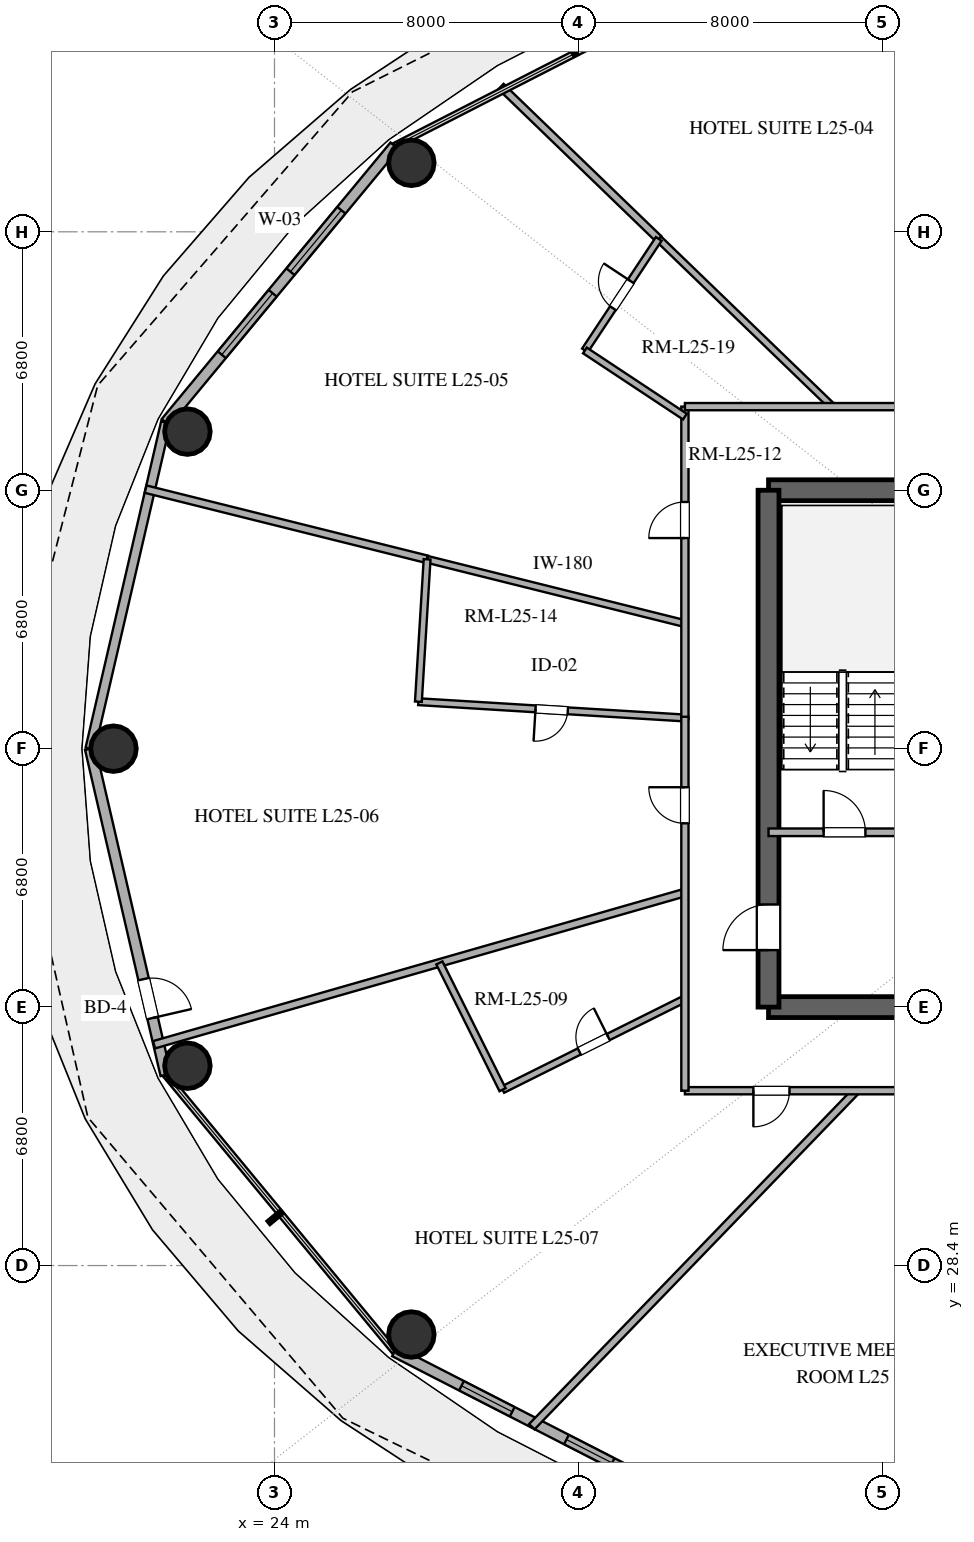
"""IFC4 building model, lengths in metres.
Left out: names, types, materials, properties, quantities, classifications, styles, units other than length and angle.
Written with IfcOpenShell. Run it as: python <this file> out.ifc"""

import sys

from ifc_helpers import new_model, si_unit, direction, frame, frame_2d, origin, origin_2d, place, context, subcontext, project, spatial, rectangle, hollow_circle, extrude, element, fill, save


model = new_model("IFC4")
c1 = context("Model", 3, precision=1e-05, world=origin(), true_north=direction((0.0, 1.0)))
c2 = subcontext(c1, "Body", "Model", "MODEL_VIEW")
j1 = project(units=[si_unit("LENGTHUNIT", "METRE"), si_unit("PLANEANGLEUNIT", "RADIAN")], contexts=[c1])
p1 = place(None, origin())
s1 = spatial("IfcSite", under=j1, at=p1, CompositionType="ELEMENT")
p2 = place(p1, origin())
s2 = spatial("IfcBuilding", under=s1, at=p2, CompositionType="ELEMENT")
p3 = place(p2, frame((0.0, 0.0, 102.0)))
s3 = spatial("IfcBuildingStorey", under=s2, at=p3, CompositionType="ELEMENT", Elevation=102.0)
for number, where, z_axis, x_axis in (
    (1, (37.0, 35.2, 0.0), (0.0, 0.0, 1.0), (1.0, 0.0, 0.0)),
    (2, (37.0, 48.8, 0.0), (0.0, 0.0, 1.0), (1.0, 0.0, 0.0)),
):
    element("IfcWall", number, at=place(p3, frame(where, z_axis=z_axis, x_axis=x_axis)), inside=s3, PredefinedType="SHEAR", context=c2, shape_type="SweptSolid", body=[
        extrude(rectangle(XDim=4.0, YDim=0.55, at=frame_2d((2.0, 0.0))), origin(), (0.0, 0.0, 1.0), 3.38),
    ])
p4 = place(p3, frame((37.0, 35.2, 0.0), z_axis=(0.0, 0.0, 1.0), x_axis=(0.0, 1.0, 0.0)))
e3 = element("IfcWall", 3, at=p4, inside=s3, PredefinedType="SHEAR", context=c2, shape_type="SweptSolid", body=[
    extrude(rectangle(XDim=13.6, YDim=0.55, at=frame_2d((6.8, 0.0))), origin(), (0.0, 0.0, 1.0), 3.38),
])
p5 = place(p4, frame((1.5, 0.0, 0.0)))
e4 = element("IfcOpeningElement", 4, at=p5, cuts=e3, PredefinedType="OPENING", context=c2, shape_type="SweptSolid", body=[
    extrude(rectangle(XDim=1.2, YDim=2.15, at=frame_2d((0.6, 1.075))), frame((0.0, 0.285, 0.0), z_axis=(0.0, -1.0, 0.0), x_axis=(1.0, 0.0, 0.0)), (0.0, 0.0, 1.0), 0.57),
])
for number, where, z_axis, x_axis in (
    (5, (27.602, 57.415, 0.0), (0.0, 0.0, 1.0), (1.0, 0.0, 0.0)),
    (6, (21.709, 50.343, 0.0), (0.0, 0.0, 1.0), (1.0, 0.0, 0.0)),
    (7, (19.763, 42.0, 0.0), (0.0, 0.0, 1.0), (1.0, 0.0, 0.0)),
    (8, (21.709, 33.657, 0.0), (0.0, 0.0, 1.0), (1.0, 0.0, 0.0)),
    (9, (27.602, 26.585, 0.0), (0.0, 0.0, 1.0), (1.0, 0.0, 0.0)),
):
    element("IfcColumn", number, at=place(p3, frame(where, z_axis=z_axis, x_axis=x_axis)), inside=s3, PredefinedType="COLUMN", context=c2, shape_type="SweptSolid", body=[
        extrude(hollow_circle(Radius=0.6, WallThickness=0.032, at=origin_2d()), origin(), (0.0, 0.0, 1.0), 3.38),
    ])
p6 = place(p3, frame((27.16, 57.86, 0.0), z_axis=(0.0, 0.0, 1.0), x_axis=(-0.637505817448, -0.770445541696, 0.0)))
e10 = element("IfcWall", 10, at=p6, inside=s3, PredefinedType="SOLIDWALL", context=c2, shape_type="SweptSolid", body=[
    extrude(rectangle(XDim=9.445, YDim=0.28, at=frame_2d((4.723, 0.0))), origin(), (0.0, 0.0, 1.0), 3.38),
])
p7 = place(p6, frame((2.197, 0.0, 0.85)))
e11 = element("IfcOpeningElement", 11, at=p7, cuts=e10, PredefinedType="OPENING", context=c2, shape_type="SweptSolid", body=[
    extrude(rectangle(XDim=2.1, YDim=2.2, at=frame_2d((1.05, 1.1))), frame((0.0, 0.15, 0.0), z_axis=(0.0, -1.0, 0.0), x_axis=(1.0, 0.0, 0.0)), (0.0, 0.0, 1.0), 0.3),
])
p8 = place(p6, frame((5.032, 0.0, 0.85)))
e12 = element("IfcOpeningElement", 12, at=p8, cuts=e10, PredefinedType="OPENING", context=c2, shape_type="SweptSolid", body=[
    extrude(rectangle(XDim=2.1, YDim=2.2, at=frame_2d((1.05, 1.1))), frame((0.0, 0.15, 0.0), z_axis=(0.0, -1.0, 0.0), x_axis=(1.0, 0.0, 0.0)), (0.0, 0.0, 1.0), 0.3),
])
p9 = place(p3, frame((21.139, 50.583, 0.0), z_axis=(0.0, 0.0, 1.0), x_axis=(-0.22558597182, -0.974223264616, 0.0)))
e13 = element("IfcWall", 13, at=p9, inside=s3, PredefinedType="SOLIDWALL", context=c2, shape_type="SweptSolid", body=[
    extrude(rectangle(XDim=8.811, YDim=0.25, at=frame_2d((4.405, 0.0))), origin(), (0.0, 0.0, 1.0), 3.38),
])
p10 = place(p3, frame((19.151, 42.0, 0.0), z_axis=(0.0, 0.0, 1.0), x_axis=(0.22558597182, -0.974223264616, 0.0)))
e14 = element("IfcWall", 14, at=p10, inside=s3, PredefinedType="SOLIDWALL", context=c2, shape_type="SweptSolid", body=[
    extrude(rectangle(XDim=8.811, YDim=0.28, at=frame_2d((4.405, 0.0))), origin(), (0.0, 0.0, 1.0), 3.38),
])
p11 = place(p10, frame((6.225, 0.0, 0.0)))
e15 = element("IfcOpeningElement", 15, at=p11, cuts=e14, PredefinedType="OPENING", context=c2, shape_type="SweptSolid", body=[
    extrude(rectangle(XDim=1.05, YDim=2.2, at=frame_2d((0.525, 1.1))), frame((0.0, 0.15, 0.0), z_axis=(0.0, -1.0, 0.0), x_axis=(1.0, 0.0, 0.0)), (0.0, 0.0, 1.0), 0.3),
])
p12 = place(p3, frame((27.16, 26.14, 0.0), z_axis=(0.0, 0.0, 1.0), x_axis=(0.889959505023, -0.45603955905, 0.0)))
e16 = element("IfcWall", 16, at=p12, inside=s3, PredefinedType="SOLIDWALL", context=c2, shape_type="SweptSolid", body=[
    extrude(rectangle(XDim=10.662, YDim=0.28, at=frame_2d((5.331, 0.0))), origin(), (0.0, 0.0, 1.0), 3.38),
])
p13 = place(p12, frame((1.979, 0.0, 0.85)))
e17 = element("IfcOpeningElement", 17, at=p13, cuts=e16, PredefinedType="OPENING", context=c2, shape_type="SweptSolid", body=[
    extrude(rectangle(XDim=1.5, YDim=1.8, at=frame_2d((0.75, 0.9))), frame((0.0, 0.15, 0.0), z_axis=(0.0, -1.0, 0.0), x_axis=(1.0, 0.0, 0.0)), (0.0, 0.0, 1.0), 0.3),
])
p14 = place(p12, frame((5.082, 0.0, 0.85)))
e18 = element("IfcOpeningElement", 18, at=p14, cuts=e16, PredefinedType="OPENING", context=c2, shape_type="SweptSolid", body=[
    extrude(rectangle(XDim=1.35, YDim=1.8, at=frame_2d((0.675, 0.9))), frame((0.0, 0.15, 0.0), z_axis=(0.0, -1.0, 0.0), x_axis=(1.0, 0.0, 0.0)), (0.0, 0.0, 1.0), 0.3),
])
p15 = place(p12, frame((7.146, 0.0, 0.85)))
e19 = element("IfcOpeningElement", 19, at=p15, cuts=e16, PredefinedType="OPENING", context=c2, shape_type="SweptSolid", body=[
    extrude(rectangle(XDim=1.35, YDim=1.8, at=frame_2d((0.675, 0.9))), frame((0.0, 0.15, 0.0), z_axis=(0.0, -1.0, 0.0), x_axis=(1.0, 0.0, 0.0)), (0.0, 0.0, 1.0), 0.3),
])
p16 = place(p3, frame((37.0, 39.8, 0.0), z_axis=(0.0, 0.0, 1.0), x_axis=(1.0, 0.0, 0.0)))
e20 = element("IfcWall", 20, at=p16, inside=s3, PredefinedType="SOLIDWALL", context=c2, shape_type="SweptSolid", body=[
    extrude(rectangle(XDim=4.0, YDim=0.2, at=frame_2d((2.0, 0.0))), origin(), (0.0, 0.0, 1.0), 2.74),
])
p17 = place(p16, frame((1.45, 0.0, 0.0)))
e21 = element("IfcOpeningElement", 21, at=p17, cuts=e20, PredefinedType="OPENING", context=c2, shape_type="SweptSolid", body=[
    extrude(rectangle(XDim=1.1, YDim=2.15, at=frame_2d((0.55, 1.075))), frame((0.0, 0.11, 0.0), z_axis=(0.0, -1.0, 0.0), x_axis=(1.0, 0.0, 0.0)), (0.0, 0.0, 1.0), 0.22),
])
p18 = place(p3, frame((30.772, 24.16, 0.0), z_axis=(0.0, 0.0, 1.0), x_axis=(0.694672506389, 0.719326149161, 0.0)))
e22 = element("IfcWall", 22, at=p18, inside=s3, PredefinedType="PARTITIONING", context=c2, shape_type="SweptSolid", body=[
    extrude(rectangle(XDim=12.289, YDim=0.2, at=frame_2d((6.145, 0.0))), origin(), (0.0, 0.0, 1.0), 2.74),
])
p19 = place(p3, frame((34.8, 38.215, 0.0), z_axis=(0.0, 0.0, 1.0), x_axis=(-0.961261030421, -0.275639676741, 0.0)))
e23 = element("IfcWall", 23, at=p19, inside=s3, PredefinedType="PARTITIONING", context=c2, shape_type="SweptSolid", body=[
    extrude(rectangle(XDim=14.531, YDim=0.2, at=frame_2d((7.266, 0.0))), origin(), (0.0, 0.0, 1.0), 2.74),
])
p20 = place(p3, frame((20.609, 48.829, 0.0), z_axis=(0.0, 0.0, 1.0), x_axis=(0.970302209845, -0.241895889938, 0.0)))
e24 = element("IfcWall", 24, at=p20, inside=s3, PredefinedType="PARTITIONING", context=c2, shape_type="SweptSolid", body=[
    extrude(rectangle(XDim=7.633, YDim=0.2, at=frame_2d((3.817, 0.0))), origin(), (0.0, 0.0, 1.0), 2.74),
])
p21 = place(p3, frame((34.8, 42.807, 0.0), z_axis=(0.0, 0.0, 1.0), x_axis=(-0.998134708281, 0.061050013314, 0.0)))
e25 = element("IfcWall", 25, at=p21, inside=s3, PredefinedType="PLUMBINGWALL", context=c2, shape_type="SweptSolid", body=[
    extrude(rectangle(XDim=7.026, YDim=0.18, at=frame_2d((3.513, 0.0))), origin(), (0.0, 0.0, 1.0), 2.74),
])
p22 = place(p21, frame((3.088, 0.0, 0.0)))
e26 = element("IfcOpeningElement", 26, at=p22, cuts=e25, PredefinedType="OPENING", context=c2, shape_type="SweptSolid", body=[
    extrude(rectangle(XDim=0.85, YDim=2.1, at=frame_2d((0.425, 1.05))), frame((0.0, 0.1, 0.0), z_axis=(0.0, -1.0, 0.0), x_axis=(1.0, 0.0, 0.0)), (0.0, 0.0, 1.0), 0.2),
])
p23 = place(p3, frame((28.016, 46.983, 0.0), z_axis=(0.0, 0.0, 1.0), x_axis=(0.970290206094, -0.241944034764, 0.0)))
e27 = element("IfcWall", 27, at=p23, inside=s3, PredefinedType="PLUMBINGWALL", context=c2, shape_type="SweptSolid", body=[
    extrude(rectangle(XDim=6.992, YDim=0.18, at=frame_2d((3.496, 0.0))), origin(), (0.0, 0.0, 1.0), 2.74),
])
p24 = place(p3, frame((47.482, 33.0, 0.0), z_axis=(0.0, 0.0, 1.0), x_axis=(-1.0, 0.0, 0.0)))
e28 = element("IfcWall", 28, at=p24, inside=s3, PredefinedType="PARTITIONING", context=c2, shape_type="SweptSolid", body=[
    extrude(rectangle(XDim=12.682, YDim=0.19, at=frame_2d((6.341, 0.0))), origin(), (0.0, 0.0, 1.0), 2.74),
])
p25 = place(p24, frame((4.455, 0.0, 0.0)))
e29 = element("IfcOpeningElement", 29, at=p25, cuts=e28, PredefinedType="OPENING", context=c2, shape_type="SweptSolid", body=[
    extrude(rectangle(XDim=1.0, YDim=2.2, at=frame_2d((0.5, 1.1))), frame((0.0, 0.105, 0.0), z_axis=(0.0, -1.0, 0.0), x_axis=(1.0, 0.0, 0.0)), (0.0, 0.0, 1.0), 0.21),
])
p26 = place(p24, frame((9.93, 0.0, 0.0)))
e30 = element("IfcOpeningElement", 30, at=p26, cuts=e28, PredefinedType="OPENING", context=c2, shape_type="SweptSolid", body=[
    extrude(rectangle(XDim=0.95, YDim=2.15, at=frame_2d((0.475, 1.075))), frame((0.0, 0.105, 0.0), z_axis=(0.0, -1.0, 0.0), x_axis=(1.0, 0.0, 0.0)), (0.0, 0.0, 1.0), 0.21),
])
p27 = place(p3, frame((34.111, 55.413, 0.0), z_axis=(0.0, 0.0, 1.0), x_axis=(0.719318009274, -0.694680935059, 0.0)))
e31 = element("IfcWall", 31, at=p27, inside=s3, PredefinedType="PLUMBINGWALL", context=c2, shape_type="SweptSolid", body=[
    extrude(rectangle(XDim=6.352, YDim=0.18, at=frame_2d((3.176, 0.0))), origin(), (0.0, 0.0, 1.0), 2.74),
])
p28 = place(p3, frame((29.959, 59.422, 0.0), z_axis=(0.0, 0.0, 1.0), x_axis=(0.719370121813, -0.694626970281, 0.0)))
e32 = element("IfcWall", 32, at=p28, inside=s3, PredefinedType="PARTITIONING", context=c2, shape_type="SweptSolid", body=[
    extrude(rectangle(XDim=5.772, YDim=0.2, at=frame_2d((2.886, 0.0))), origin(), (0.0, 0.0, 1.0), 2.74),
])
p29 = place(p3, frame((34.8, 42.775, 0.0), z_axis=(0.0, 0.0, 1.0), x_axis=(0.0, 1.0, 0.0)))
e33 = element("IfcWall", 33, at=p29, inside=s3, PredefinedType="PARTITIONING", context=c2, shape_type="SweptSolid", body=[
    extrude(rectangle(XDim=8.225, YDim=0.19, at=frame_2d((4.112, 0.0))), origin(), (0.0, 0.0, 1.0), 2.74),
])
p30 = place(p29, frame((4.767, 0.0, 0.0)))
e34 = element("IfcOpeningElement", 34, at=p30, cuts=e33, PredefinedType="OPENING", context=c2, shape_type="SweptSolid", body=[
    extrude(rectangle(XDim=0.95, YDim=2.15, at=frame_2d((0.475, 1.075))), frame((0.0, 0.105, 0.0), z_axis=(0.0, -1.0, 0.0), x_axis=(1.0, 0.0, 0.0)), (0.0, 0.0, 1.0), 0.21),
])
p31 = place(p3, frame((30.002, 33.027, 0.0), z_axis=(0.0, 0.0, 1.0), x_axis=(0.894936648514, 0.446193226244, 0.0)))
e35 = element("IfcWall", 35, at=p31, inside=s3, PredefinedType="PLUMBINGWALL", context=c2, shape_type="SweptSolid", body=[
    extrude(rectangle(XDim=5.361, YDim=0.18, at=frame_2d((2.681, 0.0))), origin(), (0.0, 0.0, 1.0), 2.74),
])
p32 = place(p31, frame((2.256, 0.0, 0.0)))
e36 = element("IfcOpeningElement", 36, at=p32, cuts=e35, PredefinedType="OPENING", context=c2, shape_type="SweptSolid", body=[
    extrude(rectangle(XDim=0.85, YDim=2.1, at=frame_2d((0.425, 1.05))), frame((0.0, 0.1, 0.0), z_axis=(0.0, -1.0, 0.0), x_axis=(1.0, 0.0, 0.0)), (0.0, 0.0, 1.0), 0.2),
])
p33 = place(p3, frame((34.8, 51.0, 0.0), z_axis=(0.0, 0.0, 1.0), x_axis=(1.0, 0.0, 0.0)))
e37 = element("IfcWall", 37, at=p33, inside=s3, PredefinedType="PARTITIONING", context=c2, shape_type="SweptSolid", body=[
    extrude(rectangle(XDim=10.653, YDim=0.19, at=frame_2d((5.326, 0.0))), origin(), (0.0, 0.0, 1.0), 2.74),
])
p34 = place(p33, frame((5.816, 0.0, 0.0)))
e38 = element("IfcOpeningElement", 38, at=p34, cuts=e37, PredefinedType="OPENING", context=c2, shape_type="SweptSolid", body=[
    extrude(rectangle(XDim=0.95, YDim=2.15, at=frame_2d((0.475, 1.075))), frame((0.0, 0.105, 0.0), z_axis=(0.0, -1.0, 0.0), x_axis=(1.0, 0.0, 0.0)), (0.0, 0.0, 1.0), 0.21),
])
p35 = place(p3, frame((34.8, 33.0, 0.0), z_axis=(0.0, 0.0, 1.0), x_axis=(0.0, 1.0, 0.0)))
e39 = element("IfcWall", 39, at=p35, inside=s3, PredefinedType="PARTITIONING", context=c2, shape_type="SweptSolid", body=[
    extrude(rectangle(XDim=9.839, YDim=0.19, at=frame_2d((4.92, 0.0))), origin(), (0.0, 0.0, 1.0), 2.74),
])
p36 = place(p35, frame((7.035, 0.0, 0.0)))
e40 = element("IfcOpeningElement", 40, at=p36, cuts=e39, PredefinedType="OPENING", context=c2, shape_type="SweptSolid", body=[
    extrude(rectangle(XDim=0.95, YDim=2.15, at=frame_2d((0.475, 1.075))), frame((0.0, 0.105, 0.0), z_axis=(0.0, -1.0, 0.0), x_axis=(1.0, 0.0, 0.0)), (0.0, 0.0, 1.0), 0.21),
])
p37 = place(p3, frame((27.787, 43.236, 0.0), z_axis=(0.0, 0.0, 1.0), x_axis=(0.061013519028, 0.998136939751, 0.0)))
e41 = element("IfcWall", 41, at=p37, inside=s3, PredefinedType="PLUMBINGWALL", context=c2, shape_type="SweptSolid", body=[
    extrude(rectangle(XDim=3.753, YDim=0.18, at=frame_2d((1.877, 0.0))), origin(), (0.0, 0.0, 1.0), 2.74),
])
p38 = place(p3, frame((28.339, 36.362, 0.0), z_axis=(0.0, 0.0, 1.0), x_axis=(0.446243949247, -0.894911357488, 0.0)))
e42 = element("IfcWall", 42, at=p38, inside=s3, PredefinedType="PLUMBINGWALL", context=c2, shape_type="SweptSolid", body=[
    extrude(rectangle(XDim=3.727, YDim=0.18, at=frame_2d((1.864, 0.0))), origin(), (0.0, 0.0, 1.0), 2.74),
])
p39 = place(p3, frame((32.169, 52.479, 0.0), z_axis=(0.0, 0.0, 1.0), x_axis=(0.551959146688, 0.833871153349, 0.0)))
e43 = element("IfcWall", 43, at=p39, inside=s3, PredefinedType="PLUMBINGWALL", context=c2, shape_type="SweptSolid", body=[
    extrude(rectangle(XDim=3.519, YDim=0.18, at=frame_2d((1.759, 0.0))), origin(), (0.0, 0.0, 1.0), 2.74),
])
p40 = place(p39, frame((1.334, 0.0, 0.0)))
e44 = element("IfcOpeningElement", 44, at=p40, cuts=e43, PredefinedType="OPENING", context=c2, shape_type="SweptSolid", body=[
    extrude(rectangle(XDim=0.85, YDim=2.1, at=frame_2d((0.425, 1.05))), frame((0.0, 0.1, 0.0), z_axis=(0.0, -1.0, 0.0), x_axis=(1.0, 0.0, 0.0)), (0.0, 0.0, 1.0), 0.2),
])
p41 = place(p3, frame((34.8, 50.737, 0.0), z_axis=(0.0, 0.0, 1.0), x_axis=(-0.833855219674, 0.5519832177, 0.0)))
e45 = element("IfcWall", 45, at=p41, inside=s3, PredefinedType="PLUMBINGWALL", context=c2, shape_type="SweptSolid", body=[
    extrude(rectangle(XDim=3.155, YDim=0.18, at=frame_2d((1.578, 0.0))), origin(), (0.0, 0.0, 1.0), 2.74),
])
p42 = place(p7, origin())
e46 = element("IfcWindow", 46, at=p42, inside=s3, PartitioningType="SINGLE_PANEL", PredefinedType="WINDOW", context=c2, shape_type="SweptSolid", body=[
    extrude(rectangle(XDim=2.1, YDim=2.2, at=frame_2d((1.05, 1.1))), frame((0.0, 0.03, 0.0), z_axis=(0.0, -1.0, 0.0), x_axis=(1.0, 0.0, 0.0)), (0.0, 0.0, 1.0), 0.06),
])
fill(e11, e46)
p43 = place(p8, origin())
e47 = element("IfcWindow", 47, at=p43, inside=s3, PartitioningType="SINGLE_PANEL", PredefinedType="WINDOW", context=c2, shape_type="SweptSolid", body=[
    extrude(rectangle(XDim=2.1, YDim=2.2, at=frame_2d((1.05, 1.1))), frame((0.0, 0.03, 0.0), z_axis=(0.0, -1.0, 0.0), x_axis=(1.0, 0.0, 0.0)), (0.0, 0.0, 1.0), 0.06),
])
fill(e12, e47)
p44 = place(p11, origin())
e48 = element("IfcDoor", 48, at=p44, inside=s3, OperationType="SINGLE_SWING_RIGHT", PredefinedType="DOOR", context=c2, shape_type="SweptSolid", body=[
    extrude(rectangle(XDim=1.05, YDim=2.2, at=frame_2d((0.525, 1.1))), frame((0.0, 0.025, 0.0), z_axis=(0.0, -1.0, 0.0), x_axis=(1.0, 0.0, 0.0)), (0.0, 0.0, 1.0), 0.05),
])
fill(e15, e48)
p45 = place(p13, origin())
e49 = element("IfcWindow", 49, at=p45, inside=s3, PartitioningType="SINGLE_PANEL", PredefinedType="WINDOW", context=c2, shape_type="SweptSolid", body=[
    extrude(rectangle(XDim=1.5, YDim=1.8, at=frame_2d((0.75, 0.9))), frame((0.0, 0.03, 0.0), z_axis=(0.0, -1.0, 0.0), x_axis=(1.0, 0.0, 0.0)), (0.0, 0.0, 1.0), 0.06),
])
fill(e17, e49)
p46 = place(p14, origin())
e50 = element("IfcWindow", 50, at=p46, inside=s3, PartitioningType="SINGLE_PANEL", PredefinedType="WINDOW", context=c2, shape_type="SweptSolid", body=[
    extrude(rectangle(XDim=1.35, YDim=1.8, at=frame_2d((0.675, 0.9))), frame((0.0, 0.03, 0.0), z_axis=(0.0, -1.0, 0.0), x_axis=(1.0, 0.0, 0.0)), (0.0, 0.0, 1.0), 0.06),
])
fill(e18, e50)
p47 = place(p5, origin())
e51 = element("IfcDoor", 51, at=p47, inside=s3, OperationType="SINGLE_SWING_LEFT", PredefinedType="DOOR", context=c2, shape_type="SweptSolid", body=[
    extrude(rectangle(XDim=1.2, YDim=2.15, at=frame_2d((0.6, 1.075))), frame((0.0, 0.025, 0.0), z_axis=(0.0, -1.0, 0.0), x_axis=(1.0, 0.0, 0.0)), (0.0, 0.0, 1.0), 0.05),
])
fill(e4, e51)
p48 = place(p17, origin())
e52 = element("IfcDoor", 52, at=p48, inside=s3, OperationType="SINGLE_SWING_LEFT", PredefinedType="DOOR", context=c2, shape_type="SweptSolid", body=[
    extrude(rectangle(XDim=1.1, YDim=2.15, at=frame_2d((0.55, 1.075))), frame((0.0, 0.025, 0.0), z_axis=(0.0, -1.0, 0.0), x_axis=(1.0, 0.0, 0.0)), (0.0, 0.0, 1.0), 0.05),
])
fill(e21, e52)
p49 = place(p22, origin())
e53 = element("IfcDoor", 53, at=p49, inside=s3, OperationType="SINGLE_SWING_RIGHT", PredefinedType="DOOR", context=c2, shape_type="SweptSolid", body=[
    extrude(rectangle(XDim=0.85, YDim=2.1, at=frame_2d((0.425, 1.05))), frame((0.0, 0.025, 0.0), z_axis=(0.0, -1.0, 0.0), x_axis=(1.0, 0.0, 0.0)), (0.0, 0.0, 1.0), 0.05),
])
fill(e26, e53)
p50 = place(p26, origin())
e54 = element("IfcDoor", 54, at=p50, inside=s3, OperationType="SINGLE_SWING_RIGHT", PredefinedType="DOOR", context=c2, shape_type="SweptSolid", body=[
    extrude(rectangle(XDim=0.95, YDim=2.15, at=frame_2d((0.475, 1.075))), frame((0.0, 0.025, 0.0), z_axis=(0.0, -1.0, 0.0), x_axis=(1.0, 0.0, 0.0)), (0.0, 0.0, 1.0), 0.05),
])
fill(e30, e54)
p51 = place(p30, origin())
e55 = element("IfcDoor", 55, at=p51, inside=s3, OperationType="SINGLE_SWING_LEFT", PredefinedType="DOOR", context=c2, shape_type="SweptSolid", body=[
    extrude(rectangle(XDim=0.95, YDim=2.15, at=frame_2d((0.475, 1.075))), frame((0.0, 0.025, 0.0), z_axis=(0.0, -1.0, 0.0), x_axis=(1.0, 0.0, 0.0)), (0.0, 0.0, 1.0), 0.05),
])
fill(e34, e55)
p52 = place(p32, origin())
e56 = element("IfcDoor", 56, at=p52, inside=s3, OperationType="SINGLE_SWING_RIGHT", PredefinedType="DOOR", context=c2, shape_type="SweptSolid", body=[
    extrude(rectangle(XDim=0.85, YDim=2.1, at=frame_2d((0.425, 1.05))), frame((0.0, 0.025, 0.0), z_axis=(0.0, -1.0, 0.0), x_axis=(1.0, 0.0, 0.0)), (0.0, 0.0, 1.0), 0.05),
])
fill(e36, e56)
p53 = place(p36, origin())
e57 = element("IfcDoor", 57, at=p53, inside=s3, OperationType="SINGLE_SWING_RIGHT", PredefinedType="DOOR", context=c2, shape_type="SweptSolid", body=[
    extrude(rectangle(XDim=0.95, YDim=2.15, at=frame_2d((0.475, 1.075))), frame((0.0, 0.025, 0.0), z_axis=(0.0, -1.0, 0.0), x_axis=(1.0, 0.0, 0.0)), (0.0, 0.0, 1.0), 0.05),
])
fill(e40, e57)
p54 = place(p40, origin())
e58 = element("IfcDoor", 58, at=p54, inside=s3, OperationType="SINGLE_SWING_RIGHT", PredefinedType="DOOR", context=c2, shape_type="SweptSolid", body=[
    extrude(rectangle(XDim=0.85, YDim=2.1, at=frame_2d((0.425, 1.05))), frame((0.0, 0.025, 0.0), z_axis=(0.0, -1.0, 0.0), x_axis=(1.0, 0.0, 0.0)), (0.0, 0.0, 1.0), 0.05),
])
fill(e44, e58)
save(model, sys.argv[1])
